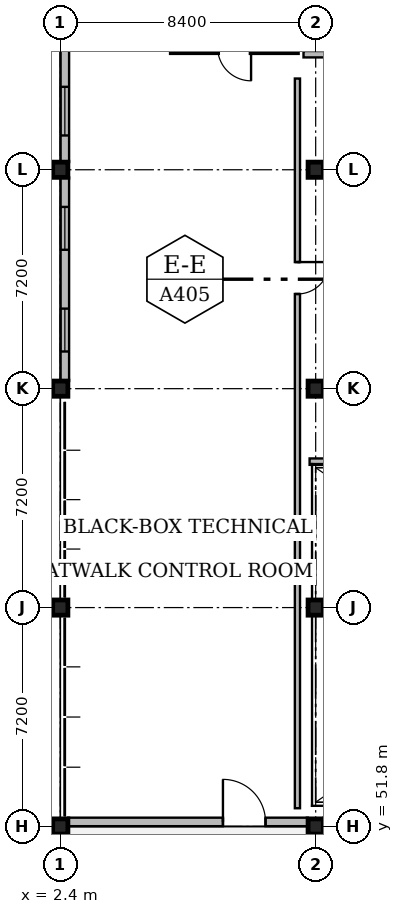
"""IFC4 building model, lengths in metres.
Left out: names, types, materials, properties, quantities, classifications, styles, units other than length and angle.
Written with IfcOpenShell. Run it as: python <this file> out.ifc"""

import sys

from ifc_helpers import new_model, si_unit, direction, frame, frame_2d, origin, origin_2d, place, context, subcontext, project, spatial, rectangle, extrude, element, fill, save


model = new_model("IFC4")
c1 = context("Model", 3, precision=1e-05, world=origin(), true_north=direction((0.0, 1.0)))
c2 = subcontext(c1, "Body", "Model", "MODEL_VIEW")
j1 = project(units=[si_unit("LENGTHUNIT", "METRE"), si_unit("PLANEANGLEUNIT", "RADIAN")], contexts=[c1])
p1 = place(None, origin())
s1 = spatial("IfcSite", under=j1, at=p1, CompositionType="ELEMENT")
p2 = place(p1, origin())
s2 = spatial("IfcBuilding", under=s1, at=p2, CompositionType="ELEMENT")
p3 = place(p2, frame((0.0, 0.0, 13.2)))
s3 = spatial("IfcBuildingStorey", under=s2, at=p3, CompositionType="ELEMENT", Elevation=13.2)
for number, where, z_axis, x_axis in (
    (1, (2.4, 51.8, 0.0), (0.0, 0.0, 1.0), (1.0, 0.0, 0.0)),
    (2, (2.4, 59.0, 0.0), (0.0, 0.0, 1.0), (1.0, 0.0, 0.0)),
    (3, (2.4, 66.2, 0.0), (0.0, 0.0, 1.0), (1.0, 0.0, 0.0)),
    (4, (2.4, 73.4, 0.0), (0.0, 0.0, 1.0), (1.0, 0.0, 0.0)),
    (5, (10.8, 51.8, 0.0), (0.0, 0.0, 1.0), (1.0, 0.0, 0.0)),
    (6, (10.8, 59.0, 0.0), (0.0, 0.0, 1.0), (1.0, 0.0, 0.0)),
    (7, (10.8, 66.2, 0.0), (0.0, 0.0, 1.0), (1.0, 0.0, 0.0)),
    (8, (10.8, 73.4, 0.0), (0.0, 0.0, 1.0), (1.0, 0.0, 0.0)),
):
    element("IfcColumn", number, at=place(p3, frame(where, z_axis=z_axis, x_axis=x_axis)), inside=s3, PredefinedType="COLUMN", context=c2, shape_type="SweptSolid", body=[
        extrude(rectangle(XDim=0.5, YDim=0.5, at=origin_2d()), origin(), (0.0, 0.0, 1.0), 3.71),
    ])
p4 = place(p3, frame((10.2, 77.425, 0.0), z_axis=(0.0, 0.0, 1.0), x_axis=(-1.0, 0.0, 0.0)))
e9 = element("IfcWall", 9, at=p4, inside=s3, PredefinedType="SOLIDWALL", context=c2, shape_type="SweptSolid", body=[
    extrude(rectangle(XDim=4.15, YDim=0.35, at=frame_2d((2.075, 0.0))), origin(), (0.0, 0.0, 1.0), 3.6),
])
p5 = place(p4, frame((1.525, 0.0, 0.0)))
e10 = element("IfcOpeningElement", 10, at=p5, cuts=e9, PredefinedType="OPENING", context=c2, shape_type="SweptSolid", body=[
    extrude(rectangle(XDim=1.1, YDim=2.15, at=frame_2d((0.55, 1.075))), frame((0.0, 0.195, 0.0), z_axis=(0.0, -1.0, 0.0), x_axis=(1.0, 0.0, 0.0)), (0.0, 0.0, 1.0), 0.39),
])
p6 = place(p3, frame((2.655, 51.95, 0.0), z_axis=(0.0, 0.0, 1.0), x_axis=(1.0, 0.0, 0.0)))
e11 = element("IfcWall", 11, at=p6, inside=s3, PredefinedType="SOLIDWALL", context=c2, shape_type="SweptSolid", body=[
    extrude(rectangle(XDim=7.89, YDim=0.28, at=frame_2d((3.945, 0.0))), origin(), (0.0, 0.0, 1.0), 3.353),
])
p7 = place(p6, frame((5.095, 0.0, 0.0)))
e12 = element("IfcOpeningElement", 12, at=p7, cuts=e11, PredefinedType="OPENING", context=c2, shape_type="SweptSolid", body=[
    extrude(rectangle(XDim=1.4, YDim=2.2, at=frame_2d((0.7, 1.1))), frame((0.0, 0.16, 0.0), z_axis=(0.0, -1.0, 0.0), x_axis=(1.0, 0.0, 0.0)), (0.0, 0.0, 1.0), 0.32),
])
p8 = place(p3, frame((11.055, 51.95, 0.0), z_axis=(0.0, 0.0, 1.0), x_axis=(1.0, 0.0, 0.0)))
e13 = element("IfcWall", 13, at=p8, inside=s3, PredefinedType="SOLIDWALL", context=c2, shape_type="SweptSolid", body=[
    extrude(rectangle(XDim=7.89, YDim=0.28, at=frame_2d((3.945, 0.0))), origin(), (0.0, 0.0, 1.0), 3.353),
])
p9 = place(p8, frame((1.177, 0.0, 0.95)))
e14 = element("IfcOpeningElement", 14, at=p9, cuts=e13, PredefinedType="OPENING", context=c2, shape_type="SweptSolid", body=[
    extrude(rectangle(XDim=1.59, YDim=2.0, at=frame_2d((0.795, 1.0))), frame((0.0, 0.16, 0.0), z_axis=(0.0, -1.0, 0.0), x_axis=(1.0, 0.0, 0.0)), (0.0, 0.0, 1.0), 0.32),
])
p10 = place(p8, frame((5.123, 0.0, 0.95)))
e15 = element("IfcOpeningElement", 15, at=p10, cuts=e13, PredefinedType="OPENING", context=c2, shape_type="SweptSolid", body=[
    extrude(rectangle(XDim=1.59, YDim=2.0, at=frame_2d((0.795, 1.0))), frame((0.0, 0.16, 0.0), z_axis=(0.0, -1.0, 0.0), x_axis=(1.0, 0.0, 0.0)), (0.0, 0.0, 1.0), 0.32),
])
p11 = place(p3, frame((2.55, 66.455, 0.0), z_axis=(0.0, 0.0, 1.0), x_axis=(0.0, 1.0, 0.0)))
e16 = element("IfcWall", 16, at=p11, inside=s3, PredefinedType="SOLIDWALL", context=c2, shape_type="SweptSolid", body=[
    extrude(rectangle(XDim=6.69, YDim=0.28, at=frame_2d((3.345, 0.0))), origin(), (0.0, 0.0, 1.0), 3.373),
])
p12 = place(p11, frame((0.968, 0.0, 0.95)))
e17 = element("IfcOpeningElement", 17, at=p12, cuts=e16, PredefinedType="OPENING", context=c2, shape_type="SweptSolid", body=[
    extrude(rectangle(XDim=1.41, YDim=1.7, at=frame_2d((0.705, 0.85))), frame((0.0, 0.16, 0.0), z_axis=(0.0, -1.0, 0.0), x_axis=(1.0, 0.0, 0.0)), (0.0, 0.0, 1.0), 0.32),
])
p13 = place(p11, frame((4.312, 0.0, 0.95)))
e18 = element("IfcOpeningElement", 18, at=p13, cuts=e16, PredefinedType="OPENING", context=c2, shape_type="SweptSolid", body=[
    extrude(rectangle(XDim=1.41, YDim=1.7, at=frame_2d((0.705, 0.85))), frame((0.0, 0.16, 0.0), z_axis=(0.0, -1.0, 0.0), x_axis=(1.0, 0.0, 0.0)), (0.0, 0.0, 1.0), 0.32),
])
p14 = place(p3, frame((2.55, 73.655, 0.0), z_axis=(0.0, 0.0, 1.0), x_axis=(0.0, 1.0, 0.0)))
e19 = element("IfcWall", 19, at=p14, inside=s3, PredefinedType="SOLIDWALL", context=c2, shape_type="SweptSolid", body=[
    extrude(rectangle(XDim=6.69, YDim=0.28, at=frame_2d((3.345, 0.0))), origin(), (0.0, 0.0, 1.0), 3.373),
])
p15 = place(p14, frame((0.873, 0.0, 0.95)))
e20 = element("IfcOpeningElement", 20, at=p15, cuts=e19, PredefinedType="OPENING", context=c2, shape_type="SweptSolid", body=[
    extrude(rectangle(XDim=1.6, YDim=1.7, at=frame_2d((0.8, 0.85))), frame((0.0, 0.16, 0.0), z_axis=(0.0, -1.0, 0.0), x_axis=(1.0, 0.0, 0.0)), (0.0, 0.0, 1.0), 0.32),
])
p16 = place(p14, frame((4.218, 0.0, 0.95)))
e21 = element("IfcOpeningElement", 21, at=p16, cuts=e19, PredefinedType="OPENING", context=c2, shape_type="SweptSolid", body=[
    extrude(rectangle(XDim=1.6, YDim=1.7, at=frame_2d((0.8, 0.85))), frame((0.0, 0.16, 0.0), z_axis=(0.0, -1.0, 0.0), x_axis=(1.0, 0.0, 0.0)), (0.0, 0.0, 1.0), 0.32),
])
p17 = place(p3, frame((10.6, 63.8, 0.0), z_axis=(0.0, 0.0, 1.0), x_axis=(1.0, 0.0, 0.0)))
e22 = element("IfcWall", 22, at=p17, inside=s3, PredefinedType="PARTITIONING", context=c2, shape_type="SweptSolid", body=[
    extrude(rectangle(XDim=9.2, YDim=0.21, at=frame_2d((4.6, 0.0))), origin(), (0.0, 0.0, 1.0), 3.66),
])
p18 = place(p3, frame((10.2, 76.4, 0.0), z_axis=(0.0, 0.0, 1.0), x_axis=(0.0, -1.0, 0.0)))
e23 = element("IfcWall", 23, at=p18, inside=s3, PredefinedType="PARTITIONING", context=c2, shape_type="SweptSolid", body=[
    extrude(rectangle(XDim=24.0, YDim=0.17, at=frame_2d((12.0, 0.0))), origin(), (0.0, 0.0, 1.0), 3.66),
])
p19 = place(p18, frame((6.036, 0.0, 0.0)))
e24 = element("IfcOpeningElement", 24, at=p19, cuts=e23, PredefinedType="OPENING", context=c2, shape_type="SweptSolid", body=[
    extrude(rectangle(XDim=1.05, YDim=2.15, at=frame_2d((0.525, 1.075))), frame((0.0, 0.105, 0.0), z_axis=(0.0, -1.0, 0.0), x_axis=(1.0, 0.0, 0.0)), (0.0, 0.0, 1.0), 0.21),
])
p20 = place(p3, frame((19.8, 77.2, 0.0), z_axis=(0.0, 0.0, 1.0), x_axis=(-1.0, 0.0, 0.0)))
e25 = element("IfcWall", 25, at=p20, inside=s3, PredefinedType="PARTITIONING", context=c2, shape_type="SweptSolid", body=[
    extrude(rectangle(XDim=9.4, YDim=0.21, at=frame_2d((4.7, 0.0))), origin(), (0.0, 0.0, 1.0), 3.66),
])
p21 = place(p20, frame((4.298, 0.0, 0.0)))
e26 = element("IfcOpeningElement", 26, at=p21, cuts=e25, PredefinedType="OPENING", context=c2, shape_type="SweptSolid", body=[
    extrude(rectangle(XDim=1.05, YDim=2.25, at=frame_2d((0.525, 1.125))), frame((0.0, 0.125, 0.0), z_axis=(0.0, -1.0, 0.0), x_axis=(1.0, 0.0, 0.0)), (0.0, 0.0, 1.0), 0.25),
])
p22 = place(p7, origin())
e27 = element("IfcDoor", 27, at=p22, inside=s3, OperationType="SINGLE_SWING_LEFT", PredefinedType="DOOR", context=c2, shape_type="SweptSolid", body=[
    extrude(rectangle(XDim=1.4, YDim=2.2, at=frame_2d((0.7, 1.1))), frame((0.0, 0.025, 0.0), z_axis=(0.0, -1.0, 0.0), x_axis=(1.0, 0.0, 0.0)), (0.0, 0.0, 1.0), 0.05),
])
fill(e12, e27)
p23 = place(p12, origin())
e28 = element("IfcWindow", 28, at=p23, inside=s3, PartitioningType="SINGLE_PANEL", PredefinedType="WINDOW", context=c2, shape_type="SweptSolid", body=[
    extrude(rectangle(XDim=1.41, YDim=1.7, at=frame_2d((0.705, 0.85))), frame((0.0, 0.03, 0.0), z_axis=(0.0, -1.0, 0.0), x_axis=(1.0, 0.0, 0.0)), (0.0, 0.0, 1.0), 0.06),
])
fill(e17, e28)
p24 = place(p13, origin())
e29 = element("IfcWindow", 29, at=p24, inside=s3, PartitioningType="SINGLE_PANEL", PredefinedType="WINDOW", context=c2, shape_type="SweptSolid", body=[
    extrude(rectangle(XDim=1.41, YDim=1.7, at=frame_2d((0.705, 0.85))), frame((0.0, 0.03, 0.0), z_axis=(0.0, -1.0, 0.0), x_axis=(1.0, 0.0, 0.0)), (0.0, 0.0, 1.0), 0.06),
])
fill(e18, e29)
p25 = place(p15, origin())
e30 = element("IfcWindow", 30, at=p25, inside=s3, PartitioningType="SINGLE_PANEL", PredefinedType="WINDOW", context=c2, shape_type="SweptSolid", body=[
    extrude(rectangle(XDim=1.6, YDim=1.7, at=frame_2d((0.8, 0.85))), frame((0.0, 0.03, 0.0), z_axis=(0.0, -1.0, 0.0), x_axis=(1.0, 0.0, 0.0)), (0.0, 0.0, 1.0), 0.06),
])
fill(e20, e30)
p26 = place(p19, origin())
e31 = element("IfcDoor", 31, at=p26, inside=s3, OperationType="SINGLE_SWING_LEFT", PredefinedType="DOOR", context=c2, shape_type="SweptSolid", body=[
    extrude(rectangle(XDim=1.05, YDim=2.15, at=frame_2d((0.525, 1.075))), frame((0.0, 0.025, 0.0), z_axis=(0.0, -1.0, 0.0), x_axis=(1.0, 0.0, 0.0)), (0.0, 0.0, 1.0), 0.05),
])
fill(e24, e31)
save(model, sys.argv[1])
